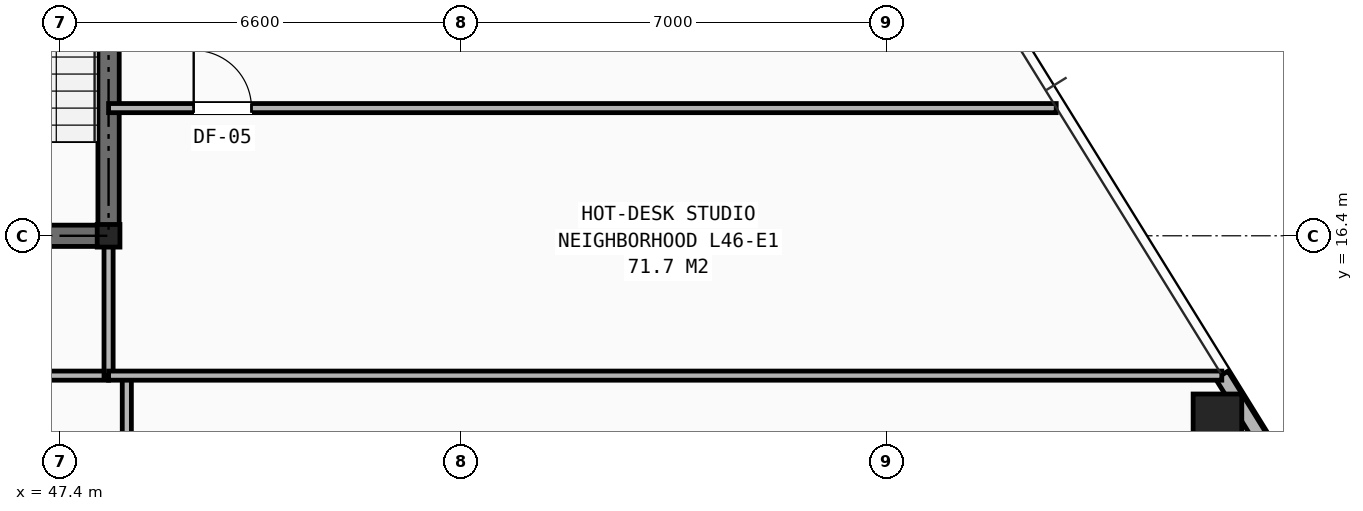
"""IFC4 building model, lengths in metres.
Left out: names, types, materials, properties, quantities, classifications, styles, units other than length and angle.
Written with IfcOpenShell. Run it as: python <this file> out.ifc"""

import sys

from ifc_helpers import new_model, si_unit, direction, frame, frame_2d, origin, origin_2d, place, context, subcontext, project, spatial, rectangle, hollow_rectangle, i_section, extrude, element, fill, save


model = new_model("IFC4")
c1 = context("Model", 3, precision=1e-05, world=origin(), true_north=direction((0.0, 1.0)))
c2 = subcontext(c1, "Body", "Model", "MODEL_VIEW")
j1 = project(units=[si_unit("LENGTHUNIT", "METRE"), si_unit("PLANEANGLEUNIT", "RADIAN")], contexts=[c1])
p1 = place(None, origin())
s1 = spatial("IfcSite", under=j1, at=p1, CompositionType="ELEMENT")
p2 = place(p1, origin())
s2 = spatial("IfcBuilding", under=s1, at=p2, CompositionType="ELEMENT")
p3 = place(p2, frame((0.0, 0.0, 162.0)))
s3 = spatial("IfcBuildingStorey", under=s2, at=p3, CompositionType="ELEMENT", Elevation=162.0)
p4 = place(p3, frame((48.2, 16.4, 0.0), z_axis=(0.0, 0.0, 1.0), x_axis=(1.0, 0.0, 0.0)))
e1 = element("IfcColumn", 1, at=p4, inside=s3, PredefinedType="COLUMN", context=c2, shape_type="SweptSolid", body=[
    extrude(i_section(OverallWidth=0.374, OverallDepth=0.372, WebThickness=0.016, FlangeThickness=0.026, at=origin_2d()), origin(), (0.0, 0.0, 1.0), 3.45),
])
p5 = place(p3, frame((66.436, 13.398, 0.0), z_axis=(0.0, 0.0, 1.0), x_axis=(1.0, 0.0, 0.0)))
e2 = element("IfcColumn", 2, at=p5, inside=s3, PredefinedType="COLUMN", context=c2, shape_type="SweptSolid", body=[
    extrude(hollow_rectangle(XDim=0.8, YDim=0.8, WallThickness=0.055, at=origin_2d()), origin(), (0.0, 0.0, 1.0), 3.45),
])
p6 = place(p3, frame((67.121, 13.118, 0.0), z_axis=(0.0, 0.0, 1.0), x_axis=(-0.526196207656, 0.850363187731, 0.0)))
e3 = element("IfcWall", 3, at=p6, inside=s3, PredefinedType="SHEAR", context=c2, shape_type="SweptSolid", body=[
    extrude(rectangle(XDim=1.167, YDim=0.24, at=frame_2d((0.583, 0.0))), origin(), (0.0, 0.0, 1.0), 2.583),
])
p7 = place(p3, frame((31.8, 16.4, 0.0), z_axis=(0.0, 0.0, 1.0), x_axis=(1.0, 0.0, 0.0)))
e4 = element("IfcWall", 4, at=p7, inside=s3, PredefinedType="SHEAR", context=c2, shape_type="SweptSolid", body=[
    extrude(rectangle(XDim=16.4, YDim=0.35, at=frame_2d((8.2, 0.0))), origin(), (0.0, 0.0, 1.0), 3.21),
])
p8 = place(p7, frame((4.2, 0.0, 0.0)))
e5 = element("IfcOpeningElement", 5, at=p8, cuts=e4, PredefinedType="OPENING", context=c2, shape_type="SweptSolid", body=[
    extrude(rectangle(XDim=0.95, YDim=2.1, at=frame_2d((0.475, 1.05))), frame((0.0, 0.185, 0.0), z_axis=(0.0, -1.0, 0.0), x_axis=(1.0, 0.0, 0.0)), (0.0, 0.0, 1.0), 0.37),
])
p9 = place(p7, frame((10.6, 0.0, 0.0)))
e6 = element("IfcOpeningElement", 6, at=p9, cuts=e4, PredefinedType="OPENING", context=c2, shape_type="SweptSolid", body=[
    extrude(rectangle(XDim=0.95, YDim=2.1, at=frame_2d((0.475, 1.05))), frame((0.0, 0.185, 0.0), z_axis=(0.0, -1.0, 0.0), x_axis=(1.0, 0.0, 0.0)), (0.0, 0.0, 1.0), 0.37),
])
p10 = place(p3, frame((48.2, 16.4, 0.0), z_axis=(0.0, 0.0, 1.0), x_axis=(0.0, 1.0, 0.0)))
e7 = element("IfcWall", 7, at=p10, inside=s3, PredefinedType="SHEAR", context=c2, shape_type="SweptSolid", body=[
    extrude(rectangle(XDim=14.8, YDim=0.35, at=frame_2d((7.4, 0.0))), origin(), (0.0, 0.0, 1.0), 3.21),
])
p11 = place(p10, frame((11.0, 0.0, 0.0)))
e8 = element("IfcOpeningElement", 8, at=p11, cuts=e7, PredefinedType="OPENING", context=c2, shape_type="SweptSolid", body=[
    extrude(rectangle(XDim=1.1, YDim=2.15, at=frame_2d((0.55, 1.075))), frame((0.0, 0.185, 0.0), z_axis=(0.0, -1.0, 0.0), x_axis=(1.0, 0.0, 0.0)), (0.0, 0.0, 1.0), 0.37),
])
p12 = place(p3, frame((29.6, 14.1, 0.0), z_axis=(0.0, 0.0, 1.0), x_axis=(1.0, 0.0, 0.0)))
e9 = element("IfcWall", 9, at=p12, inside=s3, PredefinedType="PARTITIONING", context=c2, shape_type="SweptSolid", body=[
    extrude(rectangle(XDim=18.6, YDim=0.15, at=frame_2d((9.3, 0.0))), origin(), (0.0, 0.0, 1.0), 2.252),
])
p13 = place(p12, frame((0.55, 0.0, 0.0)))
e10 = element("IfcOpeningElement", 10, at=p13, cuts=e9, PredefinedType="OPENING", context=c2, shape_type="SweptSolid", body=[
    extrude(rectangle(XDim=0.95, YDim=2.1, at=frame_2d((0.475, 1.05))), frame((0.0, 0.085, 0.0), z_axis=(0.0, -1.0, 0.0), x_axis=(1.0, 0.0, 0.0)), (0.0, 0.0, 1.0), 0.17),
])
p14 = place(p12, frame((2.25, 0.0, 0.0)))
e11 = element("IfcOpeningElement", 11, at=p14, cuts=e9, PredefinedType="OPENING", context=c2, shape_type="SweptSolid", body=[
    extrude(rectangle(XDim=0.95, YDim=2.1, at=frame_2d((0.475, 1.05))), frame((0.0, 0.085, 0.0), z_axis=(0.0, -1.0, 0.0), x_axis=(1.0, 0.0, 0.0)), (0.0, 0.0, 1.0), 0.17),
])
p15 = place(p12, frame((6.55, 0.0, 0.0)))
e12 = element("IfcOpeningElement", 12, at=p15, cuts=e9, PredefinedType="OPENING", context=c2, shape_type="SweptSolid", body=[
    extrude(rectangle(XDim=0.95, YDim=2.1, at=frame_2d((0.475, 1.05))), frame((0.0, 0.085, 0.0), z_axis=(0.0, -1.0, 0.0), x_axis=(1.0, 0.0, 0.0)), (0.0, 0.0, 1.0), 0.17),
])
p16 = place(p12, frame((10.75, 0.0, 0.0)))
e13 = element("IfcOpeningElement", 13, at=p16, cuts=e9, PredefinedType="OPENING", context=c2, shape_type="SweptSolid", body=[
    extrude(rectangle(XDim=0.95, YDim=2.1, at=frame_2d((0.475, 1.05))), frame((0.0, 0.085, 0.0), z_axis=(0.0, -1.0, 0.0), x_axis=(1.0, 0.0, 0.0)), (0.0, 0.0, 1.0), 0.17),
])
p17 = place(p12, frame((14.95, 0.0, 0.0)))
e14 = element("IfcOpeningElement", 14, at=p17, cuts=e9, PredefinedType="OPENING", context=c2, shape_type="SweptSolid", body=[
    extrude(rectangle(XDim=0.95, YDim=2.1, at=frame_2d((0.475, 1.05))), frame((0.0, 0.085, 0.0), z_axis=(0.0, -1.0, 0.0), x_axis=(1.0, 0.0, 0.0)), (0.0, 0.0, 1.0), 0.17),
])
p18 = place(p3, frame((48.2, 14.1, 0.0), z_axis=(0.0, 0.0, 1.0), x_axis=(0.0, 1.0, 0.0)))
e15 = element("IfcWall", 15, at=p18, inside=s3, PredefinedType="PARTITIONING", context=c2, shape_type="SweptSolid", body=[
    extrude(rectangle(XDim=2.3, YDim=0.15, at=frame_2d((1.15, 0.0))), origin(), (0.0, 0.0, 1.0), 2.665),
])
p19 = place(p3, frame((48.5, 6.706, 0.0), z_axis=(0.0, 0.0, 1.0), x_axis=(0.0, 1.0, 0.0)))
e16 = element("IfcWall", 16, at=p19, inside=s3, PredefinedType="PARTITIONING", context=c2, shape_type="SweptSolid", body=[
    extrude(rectangle(XDim=7.394, YDim=0.15, at=frame_2d((3.697, 0.0))), origin(), (0.0, 0.0, 1.0), 2.589),
])
p20 = place(p3, frame((48.2, 14.1, 0.0), z_axis=(0.0, 0.0, 1.0), x_axis=(1.0, 0.0, 0.0)))
e17 = element("IfcWall", 17, at=p20, inside=s3, PredefinedType="PARTITIONING", context=c2, shape_type="SweptSolid", body=[
    extrude(rectangle(XDim=18.308, YDim=0.15, at=frame_2d((9.154, 0.0))), origin(), (0.0, 0.0, 1.0), 2.589),
])
p21 = place(p3, frame((48.2, 18.5, 0.0), z_axis=(0.0, 0.0, 1.0), x_axis=(1.0, 0.0, 0.0)))
e18 = element("IfcWall", 18, at=p21, inside=s3, PredefinedType="PARTITIONING", context=c2, shape_type="SweptSolid", body=[
    extrude(rectangle(XDim=15.585, YDim=0.15, at=frame_2d((7.792, 0.0))), origin(), (0.0, 0.0, 1.0), 2.589),
])
p22 = place(p21, frame((1.4, 0.0, 0.0)))
e19 = element("IfcOpeningElement", 19, at=p22, cuts=e18, PredefinedType="OPENING", context=c2, shape_type="SweptSolid", body=[
    extrude(rectangle(XDim=0.95, YDim=2.1, at=frame_2d((0.475, 1.05))), frame((0.0, 0.085, 0.0), z_axis=(0.0, -1.0, 0.0), x_axis=(1.0, 0.0, 0.0)), (0.0, 0.0, 1.0), 0.17),
])
p23 = place(p22, origin())
e20 = element("IfcDoor", 20, at=p23, inside=s3, OperationType="SINGLE_SWING_LEFT", PredefinedType="DOOR", context=c2, shape_type="SweptSolid", body=[
    extrude(rectangle(XDim=0.95, YDim=2.1, at=frame_2d((0.475, 1.05))), frame((0.0, 0.025, 0.0), z_axis=(0.0, -1.0, 0.0), x_axis=(1.0, 0.0, 0.0)), (0.0, 0.0, 1.0), 0.05),
])
fill(e19, e20)
save(model, sys.argv[1])
